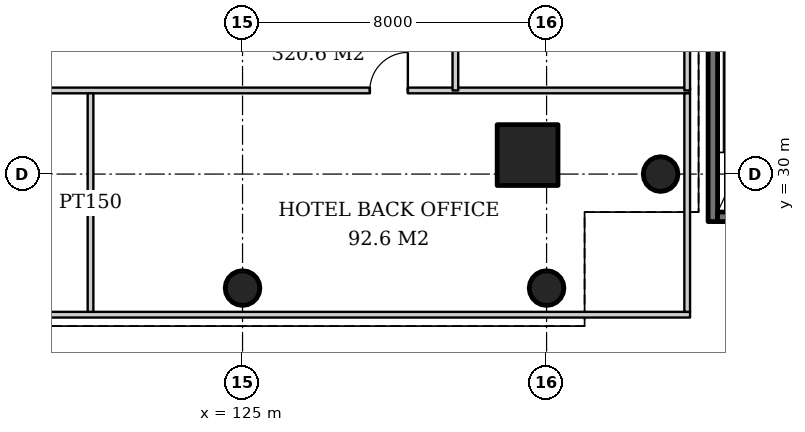
"""IFC4 building model, lengths in metres.
Left out: names, types, materials, properties, quantities, classifications, styles, units other than length and angle.
Written with IfcOpenShell. Run it as: python <this file> out.ifc"""

import sys

from ifc_helpers import new_model, si_unit, direction, frame, frame_2d, origin, origin_2d, place, context, subcontext, project, spatial, rectangle, hollow_circle, extrude, element, fill, save


model = new_model("IFC4")
c1 = context("Model", 3, precision=1e-05, world=origin(), true_north=direction((0.0, 1.0)))
c2 = subcontext(c1, "Body", "Model", "MODEL_VIEW")
j1 = project(units=[si_unit("LENGTHUNIT", "METRE"), si_unit("PLANEANGLEUNIT", "RADIAN")], contexts=[c1])
p1 = place(None, origin())
s1 = spatial("IfcSite", under=j1, at=p1, CompositionType="ELEMENT")
p2 = place(p1, origin())
s2 = spatial("IfcBuilding", under=s1, at=p2, CompositionType="ELEMENT")
p3 = place(p2, origin())
s3 = spatial("IfcBuildingStorey", under=s2, at=p3, CompositionType="ELEMENT", Elevation=0.0)
p4 = place(p3, frame((136.0, 30.0, 0.0), z_axis=(0.0, 0.0, 1.0), x_axis=(1.0, 0.0, 0.0)))
e1 = element("IfcColumn", 1, at=p4, inside=s3, PredefinedType="COLUMN", context=c2, shape_type="SweptSolid", body=[
    extrude(hollow_circle(Radius=0.457, WallThickness=0.03, at=origin_2d()), origin(), (0.0, 0.0, 1.0), 6.0),
])
p5 = place(p3, frame((132.5, 30.5, 0.0), z_axis=(0.0, 0.0, 1.0), x_axis=(1.0, 0.0, 0.0)))
e2 = element("IfcColumn", 2, at=p5, inside=s3, PredefinedType="COLUMN", context=c2, shape_type="SweptSolid", body=[
    extrude(rectangle(XDim=1.6, YDim=1.6, at=origin_2d()), origin(), (0.0, 0.0, 1.0), 6.0),
])
for number, where, z_axis, x_axis in (
    (3, (133.0, 27.0, 0.0), (0.0, 0.0, 1.0), (1.0, 0.0, 0.0)),
    (4, (125.0, 27.0, 0.0), (0.0, 0.0, 1.0), (1.0, 0.0, 0.0)),
):
    element("IfcColumn", number, at=place(p3, frame(where, z_axis=z_axis, x_axis=x_axis)), inside=s3, PredefinedType="COLUMN", context=c2, shape_type="SweptSolid", body=[
        extrude(hollow_circle(Radius=0.457, WallThickness=0.03, at=origin_2d()), origin(), (0.0, 0.0, 1.0), 6.0),
    ])
p6 = place(p3, frame((137.375, 28.75, 0.0), z_axis=(0.0, 0.0, 1.0), x_axis=(0.0, 1.0, 0.0)))
e5 = element("IfcWall", 5, at=p6, inside=s3, PredefinedType="SOLIDWALL", context=c2, shape_type="SweptSolid", body=[
    extrude(rectangle(XDim=8.5, YDim=0.25, at=frame_2d((4.25, 0.0))), origin(), (0.0, 0.0, 1.0), 5.7),
])
p7 = place(p3, frame((137.5, 28.875, 0.0), z_axis=(0.0, 0.0, 1.0), x_axis=(1.0, 0.0, 0.0)))
e6 = element("IfcWall", 6, at=p7, inside=s3, PredefinedType="SOLIDWALL", context=c2, shape_type="SweptSolid", body=[
    extrude(rectangle(XDim=3.0, YDim=0.25, at=frame_2d((1.5, 0.0))), origin(), (0.0, 0.0, 1.0), 5.7),
])
p8 = place(p3, frame((113.075, 26.3, 0.0), z_axis=(0.0, 0.0, 1.0), x_axis=(1.0, 0.0, 0.0)))
e7 = element("IfcWall", 7, at=p8, inside=s3, PredefinedType="PARTITIONING", context=c2, shape_type="SweptSolid", body=[
    extrude(rectangle(XDim=23.7, YDim=0.15, at=frame_2d((11.85, 0.0))), origin(), (0.0, 0.0, 1.0), 5.7),
])
p9 = place(p3, frame((113.075, 32.2, 0.0), z_axis=(0.0, 0.0, 1.0), x_axis=(1.0, 0.0, 0.0)))
e8 = element("IfcWall", 8, at=p9, inside=s3, PredefinedType="PARTITIONING", context=c2, shape_type="SweptSolid", body=[
    extrude(rectangle(XDim=23.7, YDim=0.15, at=frame_2d((11.85, 0.0))), origin(), (0.0, 0.0, 1.0), 4.947),
])
p10 = place(p9, frame((3.425, 0.0, 0.0)))
e9 = element("IfcOpeningElement", 9, at=p10, cuts=e8, PredefinedType="OPENING", context=c2, shape_type="SweptSolid", body=[
    extrude(rectangle(XDim=1.0, YDim=2.1, at=frame_2d((0.5, 1.05))), frame((0.0, 0.085, 0.0), z_axis=(0.0, -1.0, 0.0), x_axis=(1.0, 0.0, 0.0)), (0.0, 0.0, 1.0), 0.17),
])
p11 = place(p9, frame((15.275, 0.0, 0.0)))
e10 = element("IfcOpeningElement", 10, at=p11, cuts=e8, PredefinedType="OPENING", context=c2, shape_type="SweptSolid", body=[
    extrude(rectangle(XDim=1.0, YDim=2.1, at=frame_2d((0.5, 1.05))), frame((0.0, 0.085, 0.0), z_axis=(0.0, -1.0, 0.0), x_axis=(1.0, 0.0, 0.0)), (0.0, 0.0, 1.0), 0.17),
])
p12 = place(p3, frame((136.7, 26.375, 0.0), z_axis=(0.0, 0.0, 1.0), x_axis=(0.0, 1.0, 0.0)))
e11 = element("IfcWall", 11, at=p12, inside=s3, PredefinedType="PARTITIONING", context=c2, shape_type="SweptSolid", body=[
    extrude(rectangle(XDim=5.75, YDim=0.15, at=frame_2d((2.875, 0.0))), origin(), (0.0, 0.0, 1.0), 5.7),
])
p13 = place(p3, frame((121.0, 26.375, 0.0), z_axis=(0.0, 0.0, 1.0), x_axis=(0.0, 1.0, 0.0)))
e12 = element("IfcWall", 12, at=p13, inside=s3, PredefinedType="PARTITIONING", context=c2, shape_type="SweptSolid", body=[
    extrude(rectangle(XDim=5.75, YDim=0.15, at=frame_2d((2.875, 0.0))), origin(), (0.0, 0.0, 1.0), 5.15),
])
p14 = place(p3, frame((130.6, 32.2, 0.0), z_axis=(0.0, 0.0, 1.0), x_axis=(0.0, 1.0, 0.0)))
e13 = element("IfcWall", 13, at=p14, inside=s3, PredefinedType="PARTITIONING", context=c2, shape_type="SweptSolid", body=[
    extrude(rectangle(XDim=27.6, YDim=0.15, at=frame_2d((13.8, 0.0))), origin(), (0.0, 0.0, 1.0), 4.9),
])
p15 = place(p14, frame((6.4, 0.0, 0.0)))
e14 = element("IfcOpeningElement", 14, at=p15, cuts=e13, PredefinedType="OPENING", context=c2, shape_type="SweptSolid", body=[
    extrude(rectangle(XDim=1.0, YDim=2.1, at=frame_2d((0.5, 1.05))), frame((0.0, 0.085, 0.0), z_axis=(0.0, -1.0, 0.0), x_axis=(1.0, 0.0, 0.0)), (0.0, 0.0, 1.0), 0.17),
])
p16 = place(p14, frame((20.2, 0.0, 0.0)))
e15 = element("IfcOpeningElement", 15, at=p16, cuts=e13, PredefinedType="OPENING", context=c2, shape_type="SweptSolid", body=[
    extrude(rectangle(XDim=1.0, YDim=2.1, at=frame_2d((0.5, 1.05))), frame((0.0, 0.085, 0.0), z_axis=(0.0, -1.0, 0.0), x_axis=(1.0, 0.0, 0.0)), (0.0, 0.0, 1.0), 0.17),
])
p17 = place(p3, frame((136.7, 32.2, 0.0), z_axis=(0.0, 0.0, 1.0), x_axis=(0.0, 1.0, 0.0)))
e16 = element("IfcWall", 16, at=p17, inside=s3, PredefinedType="PARTITIONING", context=c2, shape_type="SweptSolid", body=[
    extrude(rectangle(XDim=27.6, YDim=0.15, at=frame_2d((13.8, 0.0))), origin(), (0.0, 0.0, 1.0), 5.7),
])
p18 = place(p11, origin())
e17 = element("IfcDoor", 17, at=p18, inside=s3, OperationType="SINGLE_SWING_RIGHT", PredefinedType="DOOR", context=c2, shape_type="SweptSolid", body=[
    extrude(rectangle(XDim=1.0, YDim=2.1, at=frame_2d((0.5, 1.05))), frame((0.0, 0.025, 0.0), z_axis=(0.0, -1.0, 0.0), x_axis=(1.0, 0.0, 0.0)), (0.0, 0.0, 1.0), 0.05),
])
fill(e10, e17)
save(model, sys.argv[1])
